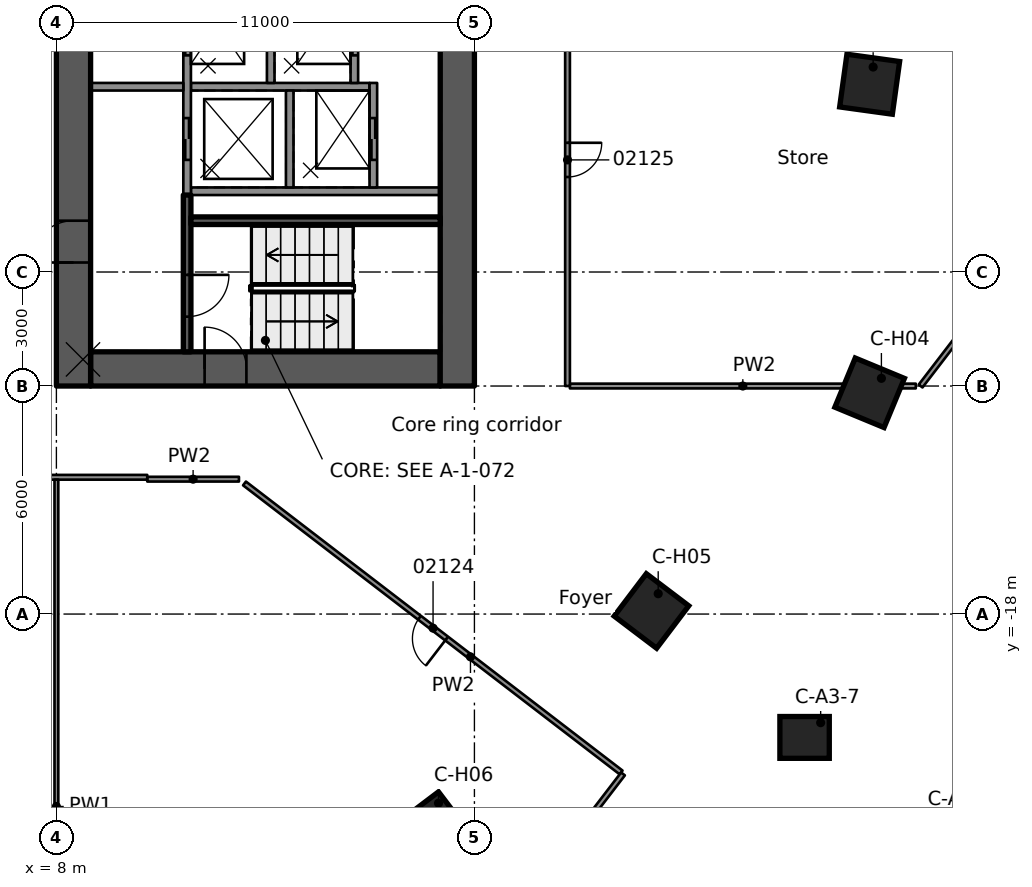
"""IFC4 building model, lengths in metres.
Left out: names, types, materials, properties, quantities, classifications, styles, units other than length and angle.
Written with IfcOpenShell. Run it as: python <this file> out.ifc"""

import sys

from ifc_helpers import new_model, si_unit, direction, frame, frame_2d, origin, origin_2d, place, context, subcontext, project, spatial, rectangle, extrude, element, fill, save


model = new_model("IFC4")
c1 = context("Model", 3, precision=1e-05, world=origin(), true_north=direction((0.0, 1.0)))
c2 = subcontext(c1, "Body", "Model", "MODEL_VIEW")
j1 = project(units=[si_unit("LENGTHUNIT", "METRE"), si_unit("PLANEANGLEUNIT", "RADIAN")], contexts=[c1])
p1 = place(None, origin())
s1 = spatial("IfcSite", under=j1, at=p1, CompositionType="ELEMENT")
p2 = place(p1, origin())
s2 = spatial("IfcBuilding", under=s1, at=p2, CompositionType="ELEMENT")
p3 = place(p2, frame((0.0, 0.0, 10.5)))
s3 = spatial("IfcBuildingStorey", under=s2, at=p3, CompositionType="ELEMENT", Elevation=10.5)
p4 = place(p3, frame((8.9, -11.55, 0.0), z_axis=(0.0, 0.0, 1.0), x_axis=(1.0, 0.0, 0.0)))
e1 = element("IfcWall", 1, at=p4, inside=s3, PredefinedType="SHEAR", context=c2, shape_type="SweptSolid", body=[
    extrude(rectangle(XDim=9.2, YDim=0.9, at=frame_2d((4.6, 0.0))), origin(), (0.0, 0.0, 1.0), 5.0),
])
p5 = place(p4, frame((3.0, 0.0, 0.0)))
e2 = element("IfcOpeningElement", 2, at=p5, cuts=e1, PredefinedType="OPENING", context=c2, shape_type="SweptSolid", body=[
    extrude(rectangle(XDim=1.1, YDim=2.1, at=frame_2d((0.55, 1.05))), frame((0.0, 0.46, 0.0), z_axis=(0.0, -1.0, 0.0), x_axis=(1.0, 0.0, 0.0)), (0.0, 0.0, 1.0), 0.92),
])
p6 = place(p3, frame((8.45, -12.0, 0.0), z_axis=(0.0, 0.0, 1.0), x_axis=(0.0, 1.0, 0.0)))
e3 = element("IfcWall", 3, at=p6, inside=s3, PredefinedType="SHEAR", context=c2, shape_type="SweptSolid", body=[
    extrude(rectangle(XDim=24.0, YDim=0.9, at=frame_2d((12.0, 0.0))), origin(), (0.0, 0.0, 1.0), 5.0),
])
p7 = place(p6, frame((12.6, 0.0, 0.0)))
e4 = element("IfcOpeningElement", 4, at=p7, cuts=e3, PredefinedType="OPENING", context=c2, shape_type="SweptSolid", body=[
    extrude(rectangle(XDim=1.8, YDim=2.1, at=frame_2d((0.9, 1.05))), frame((0.0, 0.46, 0.0), z_axis=(0.0, -1.0, 0.0), x_axis=(1.0, 0.0, 0.0)), (0.0, 0.0, 1.0), 0.92),
])
p8 = place(p6, frame((3.25, 0.0, 0.0)))
e5 = element("IfcOpeningElement", 5, at=p8, cuts=e3, PredefinedType="OPENING", context=c2, shape_type="SweptSolid", body=[
    extrude(rectangle(XDim=1.1, YDim=2.1, at=frame_2d((0.55, 1.05))), frame((0.0, 0.46, 0.0), z_axis=(0.0, -1.0, 0.0), x_axis=(1.0, 0.0, 0.0)), (0.0, 0.0, 1.0), 0.92),
])
p9 = place(p3, frame((18.55, -12.0, 0.0), z_axis=(0.0, 0.0, 1.0), x_axis=(0.0, 1.0, 0.0)))
e6 = element("IfcWall", 6, at=p9, inside=s3, PredefinedType="SHEAR", context=c2, shape_type="SweptSolid", body=[
    extrude(rectangle(XDim=24.0, YDim=0.9, at=frame_2d((12.0, 0.0))), origin(), (0.0, 0.0, 1.0), 5.0),
])
p10 = place(p9, frame((12.1, 0.0, 0.0)))
e7 = element("IfcOpeningElement", 7, at=p10, cuts=e6, PredefinedType="OPENING", context=c2, shape_type="SweptSolid", body=[
    extrude(rectangle(XDim=1.8, YDim=2.1, at=frame_2d((0.9, 1.05))), frame((0.0, 0.46, 0.0), z_axis=(0.0, -1.0, 0.0), x_axis=(1.0, 0.0, 0.0)), (0.0, 0.0, 1.0), 0.92),
])
p11 = place(p3, frame((31.179, -23.924, -1.0), z_axis=(0.0, 0.0, 1.0), x_axis=(0.707106781187, 0.707106781187, 0.0)))
e8 = element("IfcColumn", 8, at=p11, inside=s3, PredefinedType="COLUMN", context=c2, shape_type="SweptSolid", body=[
    extrude(rectangle(XDim=2.55, YDim=2.55, at=origin_2d()), origin(), (0.0, 0.0, 1.0), 1.0),
])
for number, where, z_axis, x_axis in (
    (9, (27.688, -21.246, -1.0), (0.0, 0.0, 1.0), (0.707, 0.707, 0.0)),
    (10, (29.4, -4.059, -1.0), (0.0, 0.0, 1.0), (0.707, 0.707, 0.0)),
    (11, (29.4, -12.178, -1.0), (0.0, 0.0, 1.0), (0.707, 0.707, 0.0)),
    (12, (23.659, -17.919, -1.0), (0.0, 0.0, 1.0), (0.707, 0.707, 0.0)),
    (13, (17.919, -23.659, -1.0), (0.0, 0.0, 1.0), (0.707, 0.707, 0.0)),
):
    element("IfcColumn", number, at=place(p3, frame(where, z_axis=z_axis, x_axis=x_axis)), inside=s3, PredefinedType="COLUMN", context=c2, shape_type="SweptSolid", body=[
        extrude(rectangle(XDim=3.4, YDim=3.4, at=origin_2d()), origin(), (0.0, 0.0, 1.0), 1.0),
    ])
p12 = place(p3, frame((27.688, -21.246, 0.0), z_axis=(0.0, 0.0, 1.0), x_axis=(1.0, 0.0, 0.0)))
e14 = element("IfcColumn", 14, at=p12, inside=s3, PredefinedType="COLUMN", context=c2, shape_type="SweptSolid", body=[
    extrude(rectangle(XDim=1.3, YDim=1.1, at=origin_2d()), origin(), (0.0, 0.0, 1.0), 5.0),
])
for number, where, z_axis, x_axis in (
    (15, (29.4, -4.059, 0.0), (0.0, 0.0, 1.0), (0.991, -0.137, 0.0)),
    (16, (29.4, -12.178, 0.0), (0.0, 0.0, 1.0), (0.924, -0.383, 0.0)),
    (17, (23.659, -17.919, 0.0), (0.0, 0.0, 1.0), (0.797, -0.604, 0.0)),
    (18, (17.919, -23.659, 0.0), (0.0, 0.0, 1.0), (0.604, -0.797, 0.0)),
):
    element("IfcColumn", number, at=place(p3, frame(where, z_axis=z_axis, x_axis=x_axis)), inside=s3, PredefinedType="COLUMN", context=c2, shape_type="SweptSolid", body=[
        extrude(rectangle(XDim=1.4, YDim=1.4, at=origin_2d()), origin(), (0.0, 0.0, 1.0), 5.0),
    ])
p13 = place(p3, frame((11.54, -6.875, 0.0), z_axis=(0.0, 0.0, 1.0), x_axis=(1.0, 0.0, 0.0)))
e19 = element("IfcWall", 19, at=p13, inside=s3, PredefinedType="SOLIDWALL", context=c2, shape_type="SweptSolid", body=[
    extrude(rectangle(XDim=6.56, YDim=0.2, at=frame_2d((3.28, 0.0))), origin(), (0.0, 0.0, 1.0), 4.59),
])
p14 = place(p3, frame((11.54, -4.125, 0.0), z_axis=(0.0, 0.0, 1.0), x_axis=(1.0, 0.0, 0.0)))
e20 = element("IfcWall", 20, at=p14, inside=s3, PredefinedType="SOLIDWALL", context=c2, shape_type="SweptSolid", body=[
    extrude(rectangle(XDim=4.7, YDim=0.2, at=frame_2d((2.35, 0.0))), origin(), (0.0, 0.0, 1.0), 4.59),
])
p15 = place(p3, frame((11.44, 6.975, 0.0), z_axis=(0.0, 0.0, 1.0), x_axis=(0.0, -1.0, 0.0)))
e21 = element("IfcWall", 21, at=p15, inside=s3, PredefinedType="SOLIDWALL", context=c2, shape_type="SweptSolid", body=[
    extrude(rectangle(XDim=13.95, YDim=0.2, at=frame_2d((6.975, 0.0))), origin(), (0.0, 0.0, 1.0), 4.59),
])
p16 = place(p15, frame((0.925, 0.0, 0.0)))
e22 = element("IfcOpeningElement", 22, at=p16, cuts=e21, PredefinedType="OPENING", context=c2, shape_type="SweptSolid", body=[
    extrude(rectangle(XDim=1.1, YDim=2.1, at=frame_2d((0.55, 1.05))), frame((0.0, 0.11, 0.0), z_axis=(0.0, -1.0, 0.0), x_axis=(1.0, 0.0, 0.0)), (0.0, 0.0, 1.0), 0.22),
])
p17 = place(p15, frame((6.425, 0.0, 0.0)))
e23 = element("IfcOpeningElement", 23, at=p17, cuts=e21, PredefinedType="OPENING", context=c2, shape_type="SweptSolid", body=[
    extrude(rectangle(XDim=1.1, YDim=2.1, at=frame_2d((0.55, 1.05))), frame((0.0, 0.11, 0.0), z_axis=(0.0, -1.0, 0.0), x_axis=(1.0, 0.0, 0.0)), (0.0, 0.0, 1.0), 0.22),
])
p18 = place(p15, frame((9.175, 0.0, 0.0)))
e24 = element("IfcOpeningElement", 24, at=p18, cuts=e21, PredefinedType="OPENING", context=c2, shape_type="SweptSolid", body=[
    extrude(rectangle(XDim=1.1, YDim=2.1, at=frame_2d((0.55, 1.05))), frame((0.0, 0.11, 0.0), z_axis=(0.0, -1.0, 0.0), x_axis=(1.0, 0.0, 0.0)), (0.0, 0.0, 1.0), 0.22),
])
p19 = place(p15, frame((11.925, 0.0, 0.0)))
e25 = element("IfcOpeningElement", 25, at=p19, cuts=e21, PredefinedType="OPENING", context=c2, shape_type="SweptSolid", body=[
    extrude(rectangle(XDim=1.1, YDim=2.1, at=frame_2d((0.55, 1.05))), frame((0.0, 0.11, 0.0), z_axis=(0.0, -1.0, 0.0), x_axis=(1.0, 0.0, 0.0)), (0.0, 0.0, 1.0), 0.22),
])
for number, where, z_axis, x_axis in (
    (26, (13.64, -1.475, 0.0), (0.0, 0.0, 1.0), (0.0, -1.0, 0.0)),
    (27, (14.14, -4.225, 0.0), (0.0, 0.0, 1.0), (0.0, -1.0, 0.0)),
):
    element("IfcWall", number, at=place(p3, frame(where, z_axis=z_axis, x_axis=x_axis)), inside=s3, PredefinedType="SOLIDWALL", context=c2, shape_type="SweptSolid", body=[
        extrude(rectangle(XDim=2.55, YDim=0.2, at=frame_2d((1.275, 0.0))), origin(), (0.0, 0.0, 1.0), 4.59),
    ])
p20 = place(p3, frame((15.84, 4.025, 0.0), z_axis=(0.0, 0.0, 1.0), x_axis=(0.0, -1.0, 0.0)))
e28 = element("IfcWall", 28, at=p20, inside=s3, PredefinedType="SOLIDWALL", context=c2, shape_type="SweptSolid", body=[
    extrude(rectangle(XDim=8.05, YDim=0.2, at=frame_2d((4.025, 0.0))), origin(), (0.0, 0.0, 1.0), 4.59),
])
p21 = place(p20, frame((3.475, 0.0, 0.0)))
e29 = element("IfcOpeningElement", 29, at=p21, cuts=e28, PredefinedType="OPENING", context=c2, shape_type="SweptSolid", body=[
    extrude(rectangle(XDim=1.1, YDim=2.1, at=frame_2d((0.55, 1.05))), frame((0.0, 0.11, 0.0), z_axis=(0.0, -1.0, 0.0), x_axis=(1.0, 0.0, 0.0)), (0.0, 0.0, 1.0), 0.22),
])
p22 = place(p20, frame((6.225, 0.0, 0.0)))
e30 = element("IfcOpeningElement", 30, at=p22, cuts=e28, PredefinedType="OPENING", context=c2, shape_type="SweptSolid", body=[
    extrude(rectangle(XDim=1.1, YDim=2.1, at=frame_2d((0.55, 1.05))), frame((0.0, 0.11, 0.0), z_axis=(0.0, -1.0, 0.0), x_axis=(1.0, 0.0, 0.0)), (0.0, 0.0, 1.0), 0.22),
])
p23 = place(p3, frame((16.34, -4.025, 0.0), z_axis=(0.0, 0.0, 1.0), x_axis=(0.0, -1.0, 0.0)))
e31 = element("IfcWall", 31, at=p23, inside=s3, PredefinedType="SOLIDWALL", context=c2, shape_type="SweptSolid", body=[
    extrude(rectangle(XDim=2.75, YDim=0.2, at=frame_2d((1.375, 0.0))), origin(), (0.0, 0.0, 1.0), 4.59),
])
p24 = place(p23, frame((0.925, 0.0, 0.0)))
e32 = element("IfcOpeningElement", 32, at=p24, cuts=e31, PredefinedType="OPENING", context=c2, shape_type="SweptSolid", body=[
    extrude(rectangle(XDim=1.1, YDim=2.1, at=frame_2d((0.55, 1.05))), frame((0.0, 0.11, 0.0), z_axis=(0.0, -1.0, 0.0), x_axis=(1.0, 0.0, 0.0)), (0.0, 0.0, 1.0), 0.22),
])
p25 = place(p3, frame((11.44, -6.975, 0.0), z_axis=(0.0, 0.0, 1.0), x_axis=(0.0, -1.0, 0.0)))
e33 = element("IfcWall", 33, at=p25, inside=s3, PredefinedType="SOLIDWALL", context=c2, shape_type="SweptSolid", body=[
    extrude(rectangle(XDim=4.125, YDim=0.2, at=frame_2d((2.062, 0.0))), origin(), (0.0, 0.0, 1.0), 4.59),
])
p26 = place(p25, frame((2.1, 0.0, 0.0)))
e34 = element("IfcOpeningElement", 34, at=p26, cuts=e33, PredefinedType="OPENING", context=c2, shape_type="SweptSolid", body=[
    extrude(rectangle(XDim=1.1, YDim=2.1, at=frame_2d((0.55, 1.05))), frame((0.0, 0.11, 0.0), z_axis=(0.0, -1.0, 0.0), x_axis=(1.0, 0.0, 0.0)), (0.0, 0.0, 1.0), 0.22),
])
p27 = place(p3, frame((11.54, -7.65, 0.0), z_axis=(0.0, 0.0, 1.0), x_axis=(1.0, 0.0, 0.0)))
e35 = element("IfcWall", 35, at=p27, inside=s3, PredefinedType="SOLIDWALL", context=c2, shape_type="SweptSolid", body=[
    extrude(rectangle(XDim=6.56, YDim=0.2, at=frame_2d((3.28, 0.0))), origin(), (0.0, 0.0, 1.0), 4.59),
])
p28 = place(p3, frame((8.9, -4.125, 0.0), z_axis=(0.0, 0.0, 1.0), x_axis=(1.0, 0.0, 0.0)))
e36 = element("IfcWall", 36, at=p28, inside=s3, PredefinedType="PARTITIONING", context=c2, shape_type="SweptSolid", body=[
    extrude(rectangle(XDim=2.44, YDim=0.2, at=frame_2d((1.22, 0.0))), origin(), (0.0, 0.0, 1.0), 4.59),
])
p29 = place(p3, frame((22.86, -22.168, 0.0), z_axis=(0.0, 0.0, 1.0), x_axis=(-0.793328204451, 0.608794185274, 0.0)))
e37 = element("IfcWall", 37, at=p29, inside=s3, PredefinedType="PARTITIONING", context=c2, shape_type="SweptSolid", body=[
    extrude(rectangle(XDim=12.492, YDim=0.125, at=frame_2d((6.246, 0.0))), origin(), (0.0, 0.0, 1.0), 4.58),
])
p30 = place(p29, frame((5.788, 0.0, 0.0)))
e38 = element("IfcOpeningElement", 38, at=p30, cuts=e37, PredefinedType="OPENING", context=c2, shape_type="SweptSolid", body=[
    extrude(rectangle(XDim=0.9, YDim=2.1, at=frame_2d((0.45, 1.05))), frame((0.0, 0.073, 0.0), z_axis=(0.0, -1.0, 0.0), x_axis=(1.0, 0.0, 0.0)), (0.0, 0.0, 1.0), 0.145),
])
p31 = place(p3, frame((10.391, -14.451, 0.0), z_axis=(0.0, 0.0, 1.0), x_axis=(1.0, 0.0, 0.0)))
e39 = element("IfcWall", 39, at=p31, inside=s3, PredefinedType="PARTITIONING", context=c2, shape_type="SweptSolid", body=[
    extrude(rectangle(XDim=2.413, YDim=0.125, at=frame_2d((1.207, 0.0))), origin(), (0.0, 0.0, 1.0), 4.58),
])
p32 = place(p3, frame((10.391, -14.401, 0.0), z_axis=(0.0, 0.0, 1.0), x_axis=(-1.0, 0.0, 0.0)))
e40 = element("IfcWall", 40, at=p32, inside=s3, PredefinedType="PARTITIONING", context=c2, shape_type="SweptSolid", body=[
    extrude(rectangle(XDim=20.781, YDim=0.125, at=frame_2d((10.391, 0.0))), origin(), (0.0, 0.0, 1.0), 4.58),
])
p33 = place(p32, frame((13.491, 0.0, 0.0)))
e41 = element("IfcOpeningElement", 41, at=p33, cuts=e40, PredefinedType="OPENING", context=c2, shape_type="SweptSolid", body=[
    extrude(rectangle(XDim=1.8, YDim=2.1, at=frame_2d((0.9, 1.05))), frame((0.0, 0.073, 0.0), z_axis=(0.0, -1.0, 0.0), x_axis=(1.0, 0.0, 0.0)), (0.0, 0.0, 1.0), 0.145),
])
p34 = place(p32, frame((5.491, 0.0, 0.0)))
e42 = element("IfcOpeningElement", 42, at=p34, cuts=e40, PredefinedType="OPENING", context=c2, shape_type="SweptSolid", body=[
    extrude(rectangle(XDim=1.8, YDim=2.1, at=frame_2d((0.9, 1.05))), frame((0.0, 0.073, 0.0), z_axis=(0.0, -1.0, 0.0), x_axis=(1.0, 0.0, 0.0)), (0.0, 0.0, 1.0), 0.145),
])
p35 = place(p3, frame((21.512, -12.0, 0.0), z_axis=(0.0, 0.0, 1.0), x_axis=(1.0, 0.0, 0.0)))
e43 = element("IfcWall", 43, at=p35, inside=s3, PredefinedType="PARTITIONING", context=c2, shape_type="SweptSolid", body=[
    extrude(rectangle(XDim=9.102, YDim=0.125, at=frame_2d((4.551, 0.0))), origin(), (0.0, 0.0, 1.0), 4.58),
])
p36 = place(p3, frame((51.571, -17.393, 0.0), z_axis=(0.0, 0.0, 1.0), x_axis=(-0.608824368929, -0.793305040825, 0.0)))
e44 = element("IfcWall", 44, at=p36, inside=s3, PredefinedType="PARTITIONING", context=c2, shape_type="SweptSolid", body=[
    extrude(rectangle(XDim=35.196, YDim=0.1, at=frame_2d((17.598, 0.0))), origin(), (0.0, 0.0, 1.0), 9.6),
])
p37 = place(p36, frame((21.197, 0.0, 0.0)))
e45 = element("IfcOpeningElement", 45, at=p37, cuts=e44, PredefinedType="OPENING", context=c2, shape_type="SweptSolid", body=[
    extrude(rectangle(XDim=0.9, YDim=2.1, at=frame_2d((0.45, 1.05))), frame((0.0, 0.06, 0.0), z_axis=(0.0, -1.0, 0.0), x_axis=(1.0, 0.0, 0.0)), (0.0, 0.0, 1.0), 0.12),
])
p38 = place(p36, frame((17.197, 0.0, 0.0)))
e46 = element("IfcOpeningElement", 46, at=p38, cuts=e44, PredefinedType="OPENING", context=c2, shape_type="SweptSolid", body=[
    extrude(rectangle(XDim=0.9, YDim=2.1, at=frame_2d((0.45, 1.05))), frame((0.0, 0.06, 0.0), z_axis=(0.0, -1.0, 0.0), x_axis=(1.0, 0.0, 0.0)), (0.0, 0.0, 1.0), 0.12),
])
p39 = place(p36, frame((30.946, 0.0, 0.0)))
e47 = element("IfcOpeningElement", 47, at=p39, cuts=e44, PredefinedType="OPENING", context=c2, shape_type="SweptSolid", body=[
    extrude(rectangle(XDim=0.9, YDim=2.1, at=frame_2d((0.45, 1.05))), frame((0.0, 0.06, 0.0), z_axis=(0.0, -1.0, 0.0), x_axis=(1.0, 0.0, 0.0)), (0.0, 0.0, 1.0), 0.12),
])
p40 = place(p36, frame((3.346, 0.0, 0.0)))
e48 = element("IfcOpeningElement", 48, at=p40, cuts=e44, PredefinedType="OPENING", context=c2, shape_type="SweptSolid", body=[
    extrude(rectangle(XDim=0.9, YDim=2.1, at=frame_2d((0.45, 1.05))), frame((0.0, 0.06, 0.0), z_axis=(0.0, -1.0, 0.0), x_axis=(1.0, 0.0, 0.0)), (0.0, 0.0, 1.0), 0.12),
])
p41 = place(p3, frame((15.078, -32.412, 0.0), z_axis=(0.0, 0.0, 1.0), x_axis=(0.608793231938, 0.793328936033, 0.0)))
e49 = element("IfcWall", 49, at=p41, inside=s3, PredefinedType="PARTITIONING", context=c2, shape_type="SweptSolid", body=[
    extrude(rectangle(XDim=12.865, YDim=0.125, at=frame_2d((6.432, 0.0))), origin(), (0.0, 0.0, 1.0), 4.58),
])
p42 = place(p3, frame((30.741, -12.0, 0.0), z_axis=(0.0, 0.0, 1.0), x_axis=(0.608773631009, 0.793343977218, 0.0)))
e50 = element("IfcWall", 50, at=p42, inside=s3, PredefinedType="PARTITIONING", context=c2, shape_type="SweptSolid", body=[
    extrude(rectangle(XDim=7.281, YDim=0.125, at=frame_2d((3.64, 0.0))), origin(), (0.0, 0.0, 1.0), 4.58),
])
p43 = place(p3, frame((21.45, 14.451, 0.0), z_axis=(0.0, 0.0, 1.0), x_axis=(0.0, -1.0, 0.0)))
e51 = element("IfcWall", 51, at=p43, inside=s3, PredefinedType="PARTITIONING", context=c2, shape_type="SweptSolid", body=[
    extrude(rectangle(XDim=26.451, YDim=0.125, at=frame_2d((13.226, 0.0))), origin(), (0.0, 0.0, 1.0), 4.58),
])
p44 = place(p43, frame((20.051, 0.0, 0.0)))
e52 = element("IfcOpeningElement", 52, at=p44, cuts=e51, PredefinedType="OPENING", context=c2, shape_type="SweptSolid", body=[
    extrude(rectangle(XDim=0.9, YDim=2.1, at=frame_2d((0.45, 1.05))), frame((0.0, 0.073, 0.0), z_axis=(0.0, -1.0, 0.0), x_axis=(1.0, 0.0, 0.0)), (0.0, 0.0, 1.0), 0.145),
])
p45 = place(p43, frame((7.801, 0.0, 0.0)))
e53 = element("IfcOpeningElement", 53, at=p45, cuts=e51, PredefinedType="OPENING", context=c2, shape_type="SweptSolid", body=[
    extrude(rectangle(XDim=1.1, YDim=2.1, at=frame_2d((0.55, 1.05))), frame((0.0, 0.073, 0.0), z_axis=(0.0, -1.0, 0.0), x_axis=(1.0, 0.0, 0.0)), (0.0, 0.0, 1.0), 0.145),
])
p46 = place(p3, frame((8.0, -31.663, 0.0), z_axis=(0.0, 0.0, 1.0), x_axis=(0.0, 1.0, 0.0)))
e54 = element("IfcWall", 54, at=p46, inside=s3, PredefinedType="PARTITIONING", context=c2, shape_type="SweptSolid", body=[
    extrude(rectangle(XDim=17.2, YDim=0.1, at=frame_2d((8.6, 0.0))), origin(), (0.0, 0.0, 1.0), 4.58),
])
p47 = place(p18, origin())
e55 = element("IfcDoor", 55, at=p47, inside=s3, OperationType="DOUBLE_DOOR_SLIDING", PredefinedType="DOOR", context=c2, shape_type="SweptSolid", body=[
    extrude(rectangle(XDim=1.1, YDim=2.1, at=frame_2d((0.55, 1.05))), frame((0.0, 0.025, 0.0), z_axis=(0.0, -1.0, 0.0), x_axis=(1.0, 0.0, 0.0)), (0.0, 0.0, 1.0), 0.05),
])
fill(e24, e55)
p48 = place(p22, origin())
e56 = element("IfcDoor", 56, at=p48, inside=s3, OperationType="DOUBLE_DOOR_SLIDING", PredefinedType="DOOR", context=c2, shape_type="SweptSolid", body=[
    extrude(rectangle(XDim=1.1, YDim=2.1, at=frame_2d((0.55, 1.05))), frame((0.0, 0.025, 0.0), z_axis=(0.0, -1.0, 0.0), x_axis=(1.0, 0.0, 0.0)), (0.0, 0.0, 1.0), 0.05),
])
fill(e30, e56)
p49 = place(p19, origin())
e57 = element("IfcDoor", 57, at=p49, inside=s3, OperationType="DOUBLE_DOOR_SLIDING", PredefinedType="DOOR", context=c2, shape_type="SweptSolid", body=[
    extrude(rectangle(XDim=1.1, YDim=2.1, at=frame_2d((0.55, 1.05))), frame((0.0, 0.025, 0.0), z_axis=(0.0, -1.0, 0.0), x_axis=(1.0, 0.0, 0.0)), (0.0, 0.0, 1.0), 0.05),
])
fill(e25, e57)
p50 = place(p24, origin())
e58 = element("IfcDoor", 58, at=p50, inside=s3, OperationType="DOUBLE_DOOR_SLIDING", PredefinedType="DOOR", context=c2, shape_type="SweptSolid", body=[
    extrude(rectangle(XDim=1.1, YDim=2.1, at=frame_2d((0.55, 1.05))), frame((0.0, 0.025, 0.0), z_axis=(0.0, -1.0, 0.0), x_axis=(1.0, 0.0, 0.0)), (0.0, 0.0, 1.0), 0.05),
])
fill(e32, e58)
p51 = place(p8, origin())
e59 = element("IfcDoor", 59, at=p51, inside=s3, OperationType="SINGLE_SWING_LEFT", PredefinedType="DOOR", context=c2, shape_type="SweptSolid", body=[
    extrude(rectangle(XDim=1.1, YDim=2.1, at=frame_2d((0.55, 1.05))), frame((0.0, 0.025, 0.0), z_axis=(0.0, -1.0, 0.0), x_axis=(1.0, 0.0, 0.0)), (0.0, 0.0, 1.0), 0.05),
])
fill(e5, e59)
p52 = place(p5, origin())
e60 = element("IfcDoor", 60, at=p52, inside=s3, OperationType="SINGLE_SWING_LEFT", PredefinedType="DOOR", context=c2, shape_type="SweptSolid", body=[
    extrude(rectangle(XDim=1.1, YDim=2.1, at=frame_2d((0.55, 1.05))), frame((0.0, 0.025, 0.0), z_axis=(0.0, -1.0, 0.0), x_axis=(1.0, 0.0, 0.0)), (0.0, 0.0, 1.0), 0.05),
])
fill(e2, e60)
p53 = place(p26, origin())
e61 = element("IfcDoor", 61, at=p53, inside=s3, OperationType="SINGLE_SWING_RIGHT", PredefinedType="DOOR", context=c2, shape_type="SweptSolid", body=[
    extrude(rectangle(XDim=1.1, YDim=2.1, at=frame_2d((0.55, 1.05))), frame((0.0, 0.025, 0.0), z_axis=(0.0, -1.0, 0.0), x_axis=(1.0, 0.0, 0.0)), (0.0, 0.0, 1.0), 0.05),
])
fill(e34, e61)
p54 = place(p30, origin())
e62 = element("IfcDoor", 62, at=p54, inside=s3, OperationType="SINGLE_SWING_LEFT", PredefinedType="DOOR", context=c2, shape_type="SweptSolid", body=[
    extrude(rectangle(XDim=0.9, YDim=2.1, at=frame_2d((0.45, 1.05))), frame((0.0, 0.025, 0.0), z_axis=(0.0, -1.0, 0.0), x_axis=(1.0, 0.0, 0.0)), (0.0, 0.0, 1.0), 0.05),
])
fill(e38, e62)
p55 = place(p44, origin())
e63 = element("IfcDoor", 63, at=p55, inside=s3, OperationType="SINGLE_SWING_RIGHT", PredefinedType="DOOR", context=c2, shape_type="SweptSolid", body=[
    extrude(rectangle(XDim=0.9, YDim=2.1, at=frame_2d((0.45, 1.05))), frame((0.0, 0.025, 0.0), z_axis=(0.0, -1.0, 0.0), x_axis=(1.0, 0.0, 0.0)), (0.0, 0.0, 1.0), 0.05),
])
fill(e52, e63)
save(model, sys.argv[1])
